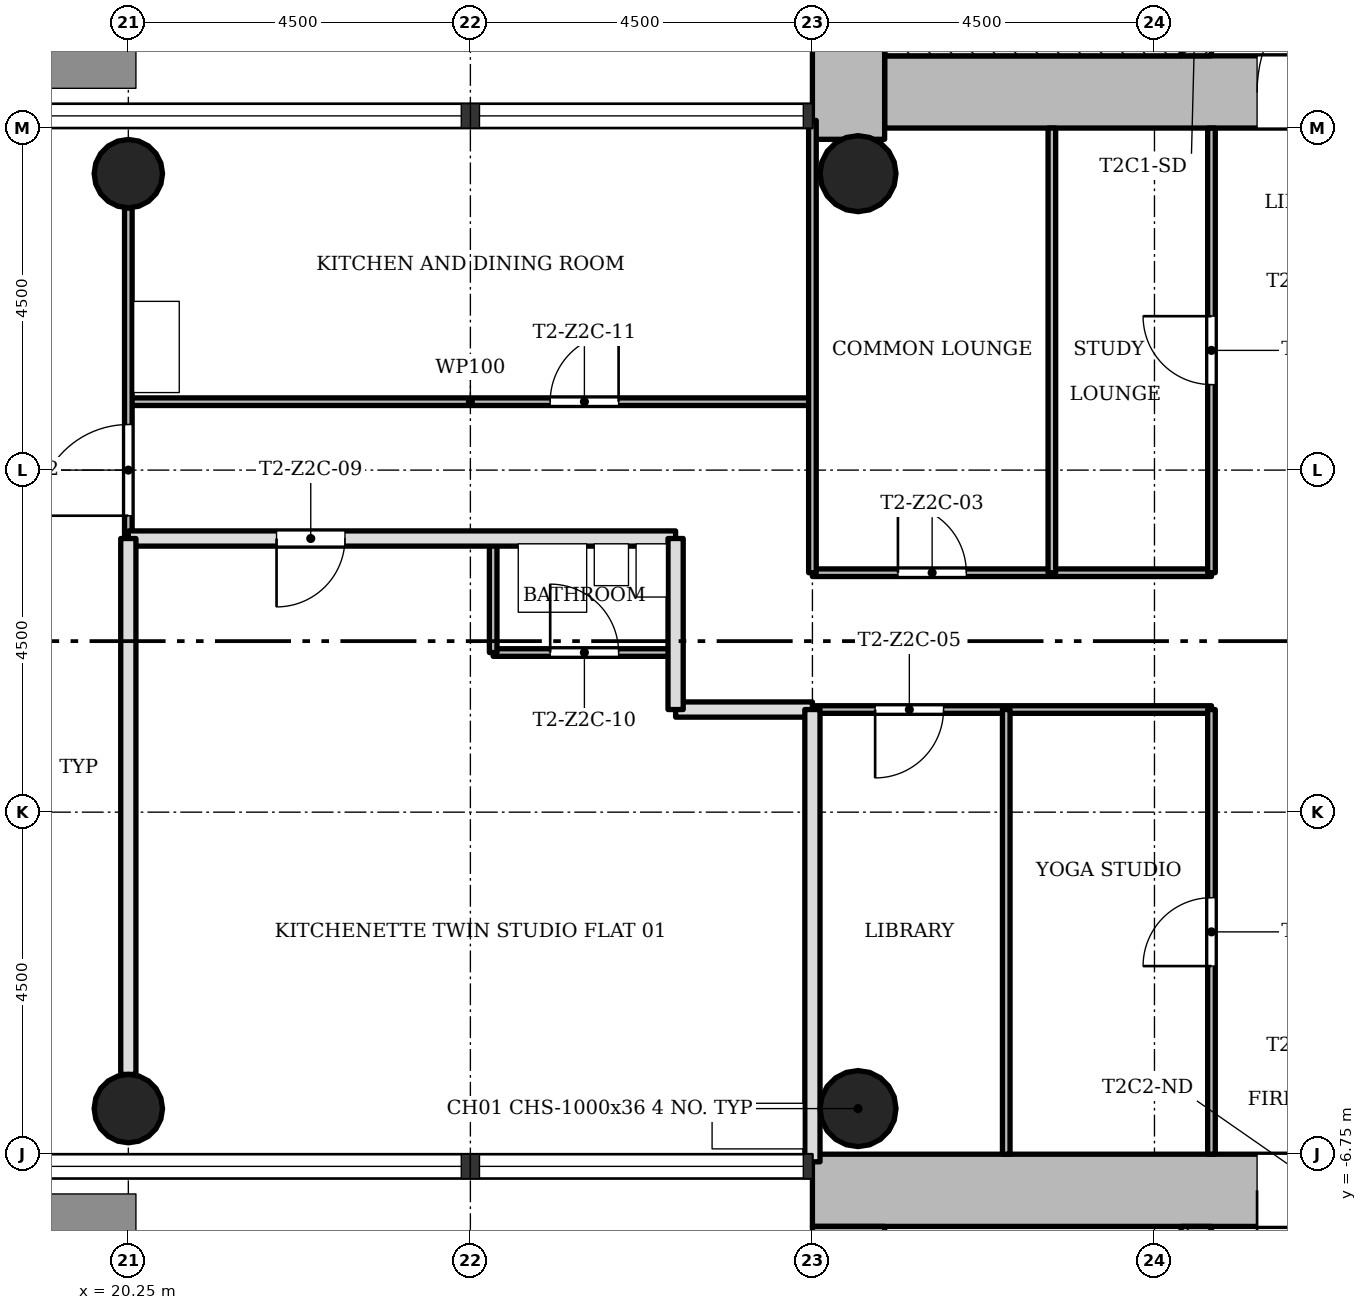
"""IFC4 building model, lengths in metres.
Left out: names, types, materials, properties, quantities, classifications, styles, units other than length and angle.
Written with IfcOpenShell. Run it as: python <this file> out.ifc"""

import sys

from ifc_helpers import new_model, si_unit, direction, frame, frame_2d, origin, origin_2d, place, context, subcontext, project, spatial, rectangle, hollow_circle, extrude, element, fill, save


model = new_model("IFC4")
c1 = context("Model", 3, precision=1e-05, world=origin(), true_north=direction((0.0, 1.0)))
c2 = subcontext(c1, "Body", "Model", "MODEL_VIEW")
j1 = project(units=[si_unit("LENGTHUNIT", "METRE"), si_unit("PLANEANGLEUNIT", "RADIAN")], contexts=[c1])
p1 = place(None, origin())
s1 = spatial("IfcSite", under=j1, at=p1, CompositionType="ELEMENT")
p2 = place(p1, origin())
s2 = spatial("IfcBuilding", under=s1, at=p2, CompositionType="ELEMENT")
p3 = place(p2, frame((0.0, 0.0, 93.6)))
s3 = spatial("IfcBuildingStorey", under=s2, at=p3, CompositionType="ELEMENT", Elevation=93.6)
p4 = place(p3, frame((30.2, 7.225, 0.0), z_axis=(0.0, 0.0, 1.0), x_axis=(1.0, 0.0, 0.0)))
e1 = element("IfcWall", 1, at=p4, inside=s3, PredefinedType="SHEAR", context=c2, shape_type="SweptSolid", body=[
    extrude(rectangle(XDim=12.55, YDim=0.95, at=frame_2d((6.275, 0.0))), origin(), (0.0, 0.0, 1.0), 3.4),
])
p5 = place(p4, frame((4.9, 0.0, 0.0)))
e2 = element("IfcOpeningElement", 2, at=p5, cuts=e1, PredefinedType="OPENING", context=c2, shape_type="SweptSolid", body=[
    extrude(rectangle(XDim=1.8, YDim=2.1, at=frame_2d((0.9, 1.05))), frame((0.0, 0.485, 0.0), z_axis=(0.0, -1.0, 0.0), x_axis=(1.0, 0.0, 0.0)), (0.0, 0.0, 1.0), 0.97),
])
p6 = place(p3, frame((29.725, 15.298, 0.0), z_axis=(0.0, 0.0, 1.0), x_axis=(0.0, -1.0, 0.0)))
e3 = element("IfcWall", 3, at=p6, inside=s3, PredefinedType="SHEAR", context=c2, shape_type="SweptSolid", body=[
    extrude(rectangle(XDim=8.696, YDim=0.95, at=frame_2d((4.348, 0.0))), origin(), (0.0, 0.0, 1.0), 3.4),
])
p7 = place(p3, frame((34.3, 7.7, 0.0), z_axis=(0.0, 0.0, 1.0), x_axis=(0.0, 1.0, 0.0)))
e4 = element("IfcWall", 4, at=p7, inside=s3, PredefinedType="SHEAR", context=c2, shape_type="SweptSolid", body=[
    extrude(rectangle(XDim=7.1, YDim=0.4, at=frame_2d((3.55, 0.0))), origin(), (0.0, 0.0, 1.0), 3.4),
])
p8 = place(p7, frame((0.7, 0.0, 0.0)))
e5 = element("IfcOpeningElement", 5, at=p8, cuts=e4, PredefinedType="OPENING", context=c2, shape_type="SweptSolid", body=[
    extrude(rectangle(XDim=0.9, YDim=2.1, at=frame_2d((0.45, 1.05))), frame((0.0, 0.21, 0.0), z_axis=(0.0, -1.0, 0.0), x_axis=(1.0, 0.0, 0.0)), (0.0, 0.0, 1.0), 0.42),
])
p9 = place(p3, frame((41.8, -7.225, 0.0), z_axis=(0.0, 0.0, 1.0), x_axis=(-1.0, 0.0, 0.0)))
e6 = element("IfcWall", 6, at=p9, inside=s3, PredefinedType="SHEAR", context=c2, shape_type="SweptSolid", body=[
    extrude(rectangle(XDim=12.55, YDim=0.95, at=frame_2d((6.275, 0.0))), origin(), (0.0, 0.0, 1.0), 3.4),
])
p10 = place(p9, frame((4.9, 0.0, 0.0)))
e7 = element("IfcOpeningElement", 7, at=p10, cuts=e6, PredefinedType="OPENING", context=c2, shape_type="SweptSolid", body=[
    extrude(rectangle(XDim=1.8, YDim=2.1, at=frame_2d((0.9, 1.05))), frame((0.0, 0.485, 0.0), z_axis=(0.0, -1.0, 0.0), x_axis=(1.0, 0.0, 0.0)), (0.0, 0.0, 1.0), 0.97),
])
p11 = place(p3, frame((29.725, -7.7, 0.0), z_axis=(0.0, 0.0, 1.0), x_axis=(0.0, -1.0, 0.0)))
e8 = element("IfcWall", 8, at=p11, inside=s3, PredefinedType="SHEAR", context=c2, shape_type="SweptSolid", body=[
    extrude(rectangle(XDim=8.05, YDim=0.95, at=frame_2d((4.025, 0.0))), origin(), (0.0, 0.0, 1.0), 3.4),
])
p12 = place(p3, frame((34.3, -14.8, 0.0), z_axis=(0.0, 0.0, 1.0), x_axis=(0.0, 1.0, 0.0)))
e9 = element("IfcWall", 9, at=p12, inside=s3, PredefinedType="SHEAR", context=c2, shape_type="SweptSolid", body=[
    extrude(rectangle(XDim=7.1, YDim=0.4, at=frame_2d((3.55, 0.0))), origin(), (0.0, 0.0, 1.0), 3.4),
])
p13 = place(p12, frame((5.2, 0.0, 0.0)))
e10 = element("IfcOpeningElement", 10, at=p13, cuts=e9, PredefinedType="OPENING", context=c2, shape_type="SweptSolid", body=[
    extrude(rectangle(XDim=1.1, YDim=2.1, at=frame_2d((0.55, 1.05))), frame((0.0, 0.21, 0.0), z_axis=(0.0, -1.0, 0.0), x_axis=(1.0, 0.0, 0.0)), (0.0, 0.0, 1.0), 0.42),
])
for number, where, z_axis, x_axis in (
    (11, (20.25, 6.15, 0.0), (0.0, 0.0, 1.0), (1.0, 0.0, 0.0)),
    (12, (20.25, -6.15, 0.0), (0.0, 0.0, 1.0), (1.0, 0.0, 0.0)),
):
    element("IfcColumn", number, at=place(p3, frame(where, z_axis=z_axis, x_axis=x_axis)), inside=s3, PredefinedType="COLUMN", context=c2, shape_type="SweptSolid", body=[
        extrude(hollow_circle(Radius=0.45, WallThickness=0.032, at=origin_2d()), origin(), (0.0, 0.0, 1.0), 3.4),
    ])
for number, where, z_axis, x_axis in (
    (13, (29.85, 6.15, 0.0), (0.0, 0.0, 1.0), (1.0, 0.0, 0.0)),
    (14, (29.85, -6.15, 0.0), (0.0, 0.0, 1.0), (1.0, 0.0, 0.0)),
):
    element("IfcColumn", number, at=place(p3, frame(where, z_axis=z_axis, x_axis=x_axis)), inside=s3, PredefinedType="COLUMN", context=c2, shape_type="SweptSolid", body=[
        extrude(hollow_circle(Radius=0.5, WallThickness=0.036, at=origin_2d()), origin(), (0.0, 0.0, 1.0), 3.4),
    ])
p14 = place(p3, frame((34.5, -0.9, 0.0), z_axis=(0.0, 0.0, 1.0), x_axis=(-1.0, 0.0, 0.0)))
e15 = element("IfcWall", 15, at=p14, inside=s3, PredefinedType="PARTITIONING", context=c2, shape_type="SweptSolid", body=[
    extrude(rectangle(XDim=5.25, YDim=0.1, at=frame_2d((2.625, 0.0))), origin(), (0.0, 0.0, 1.0), 3.0),
])
p15 = place(p14, frame((3.525, 0.0, 0.0)))
e16 = element("IfcOpeningElement", 16, at=p15, cuts=e15, PredefinedType="OPENING", context=c2, shape_type="SweptSolid", body=[
    extrude(rectangle(XDim=0.9, YDim=2.1, at=frame_2d((0.45, 1.05))), frame((0.0, 0.06, 0.0), z_axis=(0.0, -1.0, 0.0), x_axis=(1.0, 0.0, 0.0)), (0.0, 0.0, 1.0), 0.12),
])
p16 = place(p3, frame((29.25, -0.9, 0.0), z_axis=(0.0, 0.0, 1.0), x_axis=(-1.0, 0.0, 0.0)))
e17 = element("IfcWall", 17, at=p16, inside=s3, PredefinedType="SOLIDWALL", context=c2, shape_type="SweptSolid", body=[
    extrude(rectangle(XDim=1.8, YDim=0.2, at=frame_2d((0.9, 0.0))), origin(), (0.0, 0.0, 1.0), 3.0),
])
p17 = place(p3, frame((27.45, -0.15, 0.0), z_axis=(0.0, 0.0, 1.0), x_axis=(-1.0, 0.0, 0.0)))
e18 = element("IfcWall", 18, at=p17, inside=s3, PredefinedType="PARTITIONING", context=c2, shape_type="SweptSolid", body=[
    extrude(rectangle(XDim=2.4, YDim=0.1, at=frame_2d((1.2, 0.0))), origin(), (0.0, 0.0, 1.0), 3.0),
])
p18 = place(p17, frame((0.75, 0.0, 0.0)))
e19 = element("IfcOpeningElement", 19, at=p18, cuts=e18, PredefinedType="OPENING", context=c2, shape_type="SweptSolid", body=[
    extrude(rectangle(XDim=0.9, YDim=2.1, at=frame_2d((0.45, 1.05))), frame((0.0, 0.06, 0.0), z_axis=(0.0, -1.0, 0.0), x_axis=(1.0, 0.0, 0.0)), (0.0, 0.0, 1.0), 0.12),
])
p19 = place(p3, frame((34.5, 0.9, 0.0), z_axis=(0.0, 0.0, 1.0), x_axis=(-1.0, 0.0, 0.0)))
e20 = element("IfcWall", 20, at=p19, inside=s3, PredefinedType="PARTITIONING", context=c2, shape_type="SweptSolid", body=[
    extrude(rectangle(XDim=5.25, YDim=0.1, at=frame_2d((2.625, 0.0))), origin(), (0.0, 0.0, 1.0), 3.0),
])
p20 = place(p19, frame((3.225, 0.0, 0.0)))
e21 = element("IfcOpeningElement", 21, at=p20, cuts=e20, PredefinedType="OPENING", context=c2, shape_type="SweptSolid", body=[
    extrude(rectangle(XDim=0.9, YDim=2.1, at=frame_2d((0.45, 1.05))), frame((0.0, 0.06, 0.0), z_axis=(0.0, -1.0, 0.0), x_axis=(1.0, 0.0, 0.0)), (0.0, 0.0, 1.0), 0.12),
])
p21 = place(p3, frame((27.45, 1.35, 0.0), z_axis=(0.0, 0.0, 1.0), x_axis=(-1.0, 0.0, 0.0)))
e22 = element("IfcWall", 22, at=p21, inside=s3, PredefinedType="SOLIDWALL", context=c2, shape_type="SweptSolid", body=[
    extrude(rectangle(XDim=7.2, YDim=0.2, at=frame_2d((3.6, 0.0))), origin(), (0.0, 0.0, 1.0), 3.0),
])
p22 = place(p21, frame((4.35, 0.0, 0.0)))
e23 = element("IfcOpeningElement", 23, at=p22, cuts=e22, PredefinedType="OPENING", context=c2, shape_type="SweptSolid", body=[
    extrude(rectangle(XDim=0.9, YDim=2.1, at=frame_2d((0.45, 1.05))), frame((0.0, 0.11, 0.0), z_axis=(0.0, -1.0, 0.0), x_axis=(1.0, 0.0, 0.0)), (0.0, 0.0, 1.0), 0.22),
])
p23 = place(p3, frame((29.25, 3.15, 0.0), z_axis=(0.0, 0.0, 1.0), x_axis=(-1.0, 0.0, 0.0)))
e24 = element("IfcWall", 24, at=p23, inside=s3, PredefinedType="PARTITIONING", context=c2, shape_type="SweptSolid", body=[
    extrude(rectangle(XDim=9.0, YDim=0.1, at=frame_2d((4.5, 0.0))), origin(), (0.0, 0.0, 1.0), 3.0),
])
p24 = place(p23, frame((2.55, 0.0, 0.0)))
e25 = element("IfcOpeningElement", 25, at=p24, cuts=e24, PredefinedType="OPENING", context=c2, shape_type="SweptSolid", body=[
    extrude(rectangle(XDim=0.9, YDim=2.1, at=frame_2d((0.45, 1.05))), frame((0.0, 0.06, 0.0), z_axis=(0.0, -1.0, 0.0), x_axis=(1.0, 0.0, 0.0)), (0.0, 0.0, 1.0), 0.12),
])
p25 = place(p3, frame((34.5, -6.75, 0.0), z_axis=(0.0, 0.0, 1.0), x_axis=(0.0, 1.0, 0.0)))
e26 = element("IfcWall", 26, at=p25, inside=s3, PredefinedType="PARTITIONING", context=c2, shape_type="SweptSolid", body=[
    extrude(rectangle(XDim=5.85, YDim=0.1, at=frame_2d((2.925, 0.0))), origin(), (0.0, 0.0, 1.0), 3.0),
])
p26 = place(p25, frame((2.475, 0.0, 0.0)))
e27 = element("IfcOpeningElement", 27, at=p26, cuts=e26, PredefinedType="OPENING", context=c2, shape_type="SweptSolid", body=[
    extrude(rectangle(XDim=0.9, YDim=2.1, at=frame_2d((0.45, 1.05))), frame((0.0, 0.06, 0.0), z_axis=(0.0, -1.0, 0.0), x_axis=(1.0, 0.0, 0.0)), (0.0, 0.0, 1.0), 0.12),
])
p27 = place(p3, frame((34.5, 0.9, 0.0), z_axis=(0.0, 0.0, 1.0), x_axis=(0.0, 1.0, 0.0)))
e28 = element("IfcWall", 28, at=p27, inside=s3, PredefinedType="PARTITIONING", context=c2, shape_type="SweptSolid", body=[
    extrude(rectangle(XDim=5.85, YDim=0.1, at=frame_2d((2.925, 0.0))), origin(), (0.0, 0.0, 1.0), 3.0),
])
p28 = place(p27, frame((2.475, 0.0, 0.0)))
e29 = element("IfcOpeningElement", 29, at=p28, cuts=e28, PredefinedType="OPENING", context=c2, shape_type="SweptSolid", body=[
    extrude(rectangle(XDim=0.9, YDim=2.1, at=frame_2d((0.45, 1.05))), frame((0.0, 0.06, 0.0), z_axis=(0.0, -1.0, 0.0), x_axis=(1.0, 0.0, 0.0)), (0.0, 0.0, 1.0), 0.12),
])
for number, where, z_axis, x_axis in (
    (30, (32.4, 0.9, 0.0), (0.0, 0.0, 1.0), (0.0, 1.0, 0.0)),
    (31, (31.8, -6.75, 0.0), (0.0, 0.0, 1.0), (0.0, 1.0, 0.0)),
):
    element("IfcWall", number, at=place(p3, frame(where, z_axis=z_axis, x_axis=x_axis)), inside=s3, PredefinedType="PARTITIONING", context=c2, shape_type="SweptSolid", body=[
        extrude(rectangle(XDim=5.85, YDim=0.1, at=frame_2d((2.925, 0.0))), origin(), (0.0, 0.0, 1.0), 3.0),
    ])
p29 = place(p3, frame((29.25, 0.9, 0.0), z_axis=(0.0, 0.0, 1.0), x_axis=(0.0, 1.0, 0.0)))
e32 = element("IfcWall", 32, at=p29, inside=s3, PredefinedType="PARTITIONING", context=c2, shape_type="SweptSolid", body=[
    extrude(rectangle(XDim=5.95, YDim=0.1, at=frame_2d((2.975, 0.0))), origin(), (0.0, 0.0, 1.0), 3.0),
])
p30 = place(p3, frame((29.25, -6.85, 0.0), z_axis=(0.0, 0.0, 1.0), x_axis=(0.0, 1.0, 0.0)))
e33 = element("IfcWall", 33, at=p30, inside=s3, PredefinedType="SOLIDWALL", context=c2, shape_type="SweptSolid", body=[
    extrude(rectangle(XDim=5.95, YDim=0.2, at=frame_2d((2.975, 0.0))), origin(), (0.0, 0.0, 1.0), 3.0),
])
p31 = place(p3, frame((27.45, -0.9, 0.0), z_axis=(0.0, 0.0, 1.0), x_axis=(0.0, 1.0, 0.0)))
e34 = element("IfcWall", 34, at=p31, inside=s3, PredefinedType="SOLIDWALL", context=c2, shape_type="SweptSolid", body=[
    extrude(rectangle(XDim=2.25, YDim=0.2, at=frame_2d((1.125, 0.0))), origin(), (0.0, 0.0, 1.0), 3.0),
])
p32 = place(p3, frame((25.05, -0.15, 0.0), z_axis=(0.0, 0.0, 1.0), x_axis=(0.0, 1.0, 0.0)))
e35 = element("IfcWall", 35, at=p32, inside=s3, PredefinedType="PARTITIONING", context=c2, shape_type="SweptSolid", body=[
    extrude(rectangle(XDim=1.5, YDim=0.1, at=frame_2d((0.75, 0.0))), origin(), (0.0, 0.0, 1.0), 3.0),
])
p33 = place(p3, frame((20.25, 1.35, 0.0), z_axis=(0.0, 0.0, 1.0), x_axis=(0.0, 1.0, 0.0)))
e36 = element("IfcWall", 36, at=p33, inside=s3, PredefinedType="PARTITIONING", context=c2, shape_type="SweptSolid", body=[
    extrude(rectangle(XDim=4.35, YDim=0.1, at=frame_2d((2.175, 0.0))), origin(), (0.0, 0.0, 1.0), 3.0),
])
p34 = place(p33, frame((0.3, 0.0, 0.0)))
e37 = element("IfcOpeningElement", 37, at=p34, cuts=e36, PredefinedType="OPENING", context=c2, shape_type="SweptSolid", body=[
    extrude(rectangle(XDim=1.2, YDim=2.1, at=frame_2d((0.6, 1.05))), frame((0.0, 0.06, 0.0), z_axis=(0.0, -1.0, 0.0), x_axis=(1.0, 0.0, 0.0)), (0.0, 0.0, 1.0), 0.12),
])
p35 = place(p3, frame((20.25, -5.7, 0.0), z_axis=(0.0, 0.0, 1.0), x_axis=(0.0, 1.0, 0.0)))
e38 = element("IfcWall", 38, at=p35, inside=s3, PredefinedType="SOLIDWALL", context=c2, shape_type="SweptSolid", body=[
    extrude(rectangle(XDim=7.05, YDim=0.2, at=frame_2d((3.525, 0.0))), origin(), (0.0, 0.0, 1.0), 3.0),
])
p36 = place(p3, frame((34.1, 7.825, 0.0), z_axis=(0.0, 0.0, 1.0), x_axis=(-1.0, 0.0, 0.0)))
e39 = element("IfcWall", 39, at=p36, inside=s3, PredefinedType="SHEAR", context=c2, shape_type="SweptSolid", body=[
    extrude(rectangle(XDim=3.9, YDim=0.25, at=frame_2d((1.95, 0.0))), origin(), (0.0, 0.0, 1.0), 3.4),
])
p37 = place(p28, origin())
e40 = element("IfcDoor", 40, at=p37, inside=s3, OperationType="SINGLE_SWING_LEFT", PredefinedType="DOOR", context=c2, shape_type="SweptSolid", body=[
    extrude(rectangle(XDim=0.9, YDim=2.1, at=frame_2d((0.45, 1.05))), frame((0.0, 0.025, 0.0), z_axis=(0.0, -1.0, 0.0), x_axis=(1.0, 0.0, 0.0)), (0.0, 0.0, 1.0), 0.05),
])
fill(e29, e40)
p38 = place(p20, origin())
e41 = element("IfcDoor", 41, at=p38, inside=s3, OperationType="SINGLE_SWING_RIGHT", PredefinedType="DOOR", context=c2, shape_type="SweptSolid", body=[
    extrude(rectangle(XDim=0.9, YDim=2.1, at=frame_2d((0.45, 1.05))), frame((0.0, 0.025, 0.0), z_axis=(0.0, -1.0, 0.0), x_axis=(1.0, 0.0, 0.0)), (0.0, 0.0, 1.0), 0.05),
])
fill(e21, e41)
p39 = place(p26, origin())
e42 = element("IfcDoor", 42, at=p39, inside=s3, OperationType="SINGLE_SWING_RIGHT", PredefinedType="DOOR", context=c2, shape_type="SweptSolid", body=[
    extrude(rectangle(XDim=0.9, YDim=2.1, at=frame_2d((0.45, 1.05))), frame((0.0, 0.025, 0.0), z_axis=(0.0, -1.0, 0.0), x_axis=(1.0, 0.0, 0.0)), (0.0, 0.0, 1.0), 0.05),
])
fill(e27, e42)
p40 = place(p15, origin())
e43 = element("IfcDoor", 43, at=p40, inside=s3, OperationType="SINGLE_SWING_LEFT", PredefinedType="DOOR", context=c2, shape_type="SweptSolid", body=[
    extrude(rectangle(XDim=0.9, YDim=2.1, at=frame_2d((0.45, 1.05))), frame((0.0, 0.025, 0.0), z_axis=(0.0, -1.0, 0.0), x_axis=(1.0, 0.0, 0.0)), (0.0, 0.0, 1.0), 0.05),
])
fill(e16, e43)
p41 = place(p22, origin())
e44 = element("IfcDoor", 44, at=p41, inside=s3, OperationType="SINGLE_SWING_LEFT", PredefinedType="DOOR", context=c2, shape_type="SweptSolid", body=[
    extrude(rectangle(XDim=0.9, YDim=2.1, at=frame_2d((0.45, 1.05))), frame((0.0, 0.025, 0.0), z_axis=(0.0, -1.0, 0.0), x_axis=(1.0, 0.0, 0.0)), (0.0, 0.0, 1.0), 0.05),
])
fill(e23, e44)
p42 = place(p18, origin())
e45 = element("IfcDoor", 45, at=p42, inside=s3, OperationType="SINGLE_SWING_RIGHT", PredefinedType="DOOR", context=c2, shape_type="SweptSolid", body=[
    extrude(rectangle(XDim=0.9, YDim=2.1, at=frame_2d((0.45, 1.05))), frame((0.0, 0.025, 0.0), z_axis=(0.0, -1.0, 0.0), x_axis=(1.0, 0.0, 0.0)), (0.0, 0.0, 1.0), 0.05),
])
fill(e19, e45)
p43 = place(p24, origin())
e46 = element("IfcDoor", 46, at=p43, inside=s3, OperationType="SINGLE_SWING_LEFT", PredefinedType="DOOR", context=c2, shape_type="SweptSolid", body=[
    extrude(rectangle(XDim=0.9, YDim=2.1, at=frame_2d((0.45, 1.05))), frame((0.0, 0.025, 0.0), z_axis=(0.0, -1.0, 0.0), x_axis=(1.0, 0.0, 0.0)), (0.0, 0.0, 1.0), 0.05),
])
fill(e25, e46)
p44 = place(p34, origin())
e47 = element("IfcDoor", 47, at=p44, inside=s3, OperationType="SINGLE_SWING_RIGHT", PredefinedType="DOOR", context=c2, shape_type="SweptSolid", body=[
    extrude(rectangle(XDim=1.2, YDim=2.1, at=frame_2d((0.6, 1.05))), frame((0.0, 0.025, 0.0), z_axis=(0.0, -1.0, 0.0), x_axis=(1.0, 0.0, 0.0)), (0.0, 0.0, 1.0), 0.05),
])
fill(e37, e47)
p45 = place(p5, origin())
e48 = element("IfcDoor", 48, at=p45, inside=s3, OperationType="SINGLE_SWING_LEFT", PredefinedType="DOOR", context=c2, shape_type="SweptSolid", body=[
    extrude(rectangle(XDim=1.8, YDim=2.1, at=frame_2d((0.9, 1.05))), frame((0.0, 0.025, 0.0), z_axis=(0.0, -1.0, 0.0), x_axis=(1.0, 0.0, 0.0)), (0.0, 0.0, 1.0), 0.05),
])
fill(e2, e48)
p46 = place(p10, origin())
e49 = element("IfcDoor", 49, at=p46, inside=s3, OperationType="SINGLE_SWING_LEFT", PredefinedType="DOOR", context=c2, shape_type="SweptSolid", body=[
    extrude(rectangle(XDim=1.8, YDim=2.1, at=frame_2d((0.9, 1.05))), frame((0.0, 0.025, 0.0), z_axis=(0.0, -1.0, 0.0), x_axis=(1.0, 0.0, 0.0)), (0.0, 0.0, 1.0), 0.05),
])
fill(e7, e49)
save(model, sys.argv[1])
